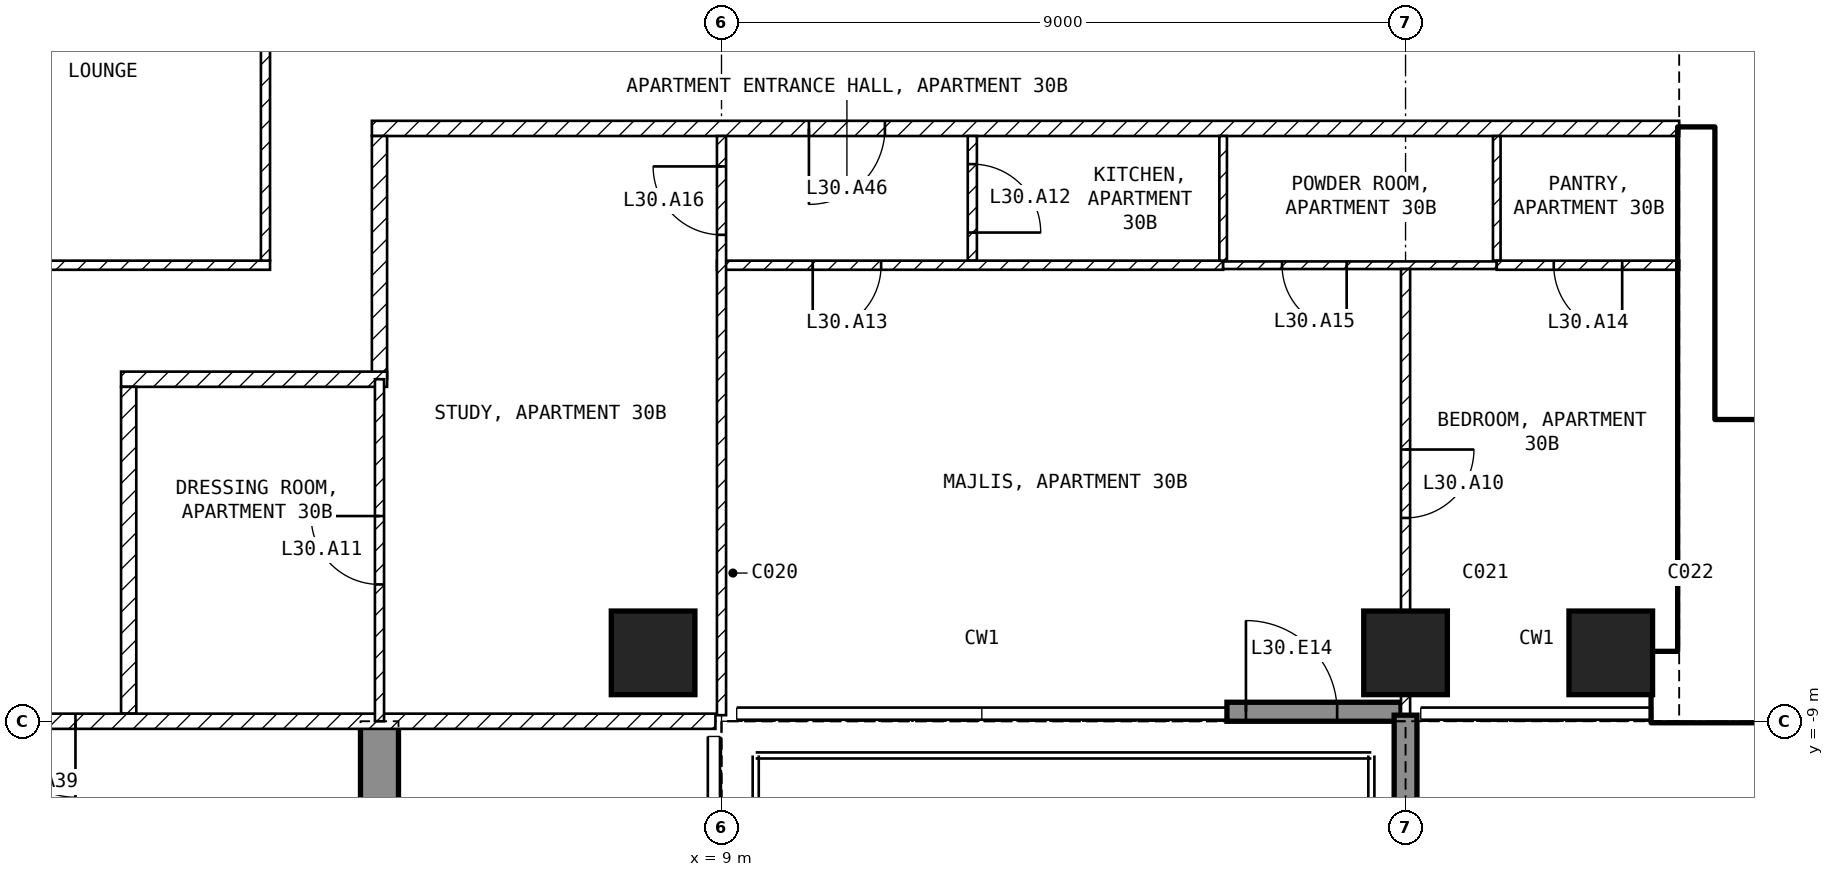
"""IFC4 building model, lengths in metres.
Left out: names, types, materials, properties, quantities, classifications, styles, units other than length and angle.
Written with IfcOpenShell. Run it as: python <this file> out.ifc"""

import sys

from ifc_helpers import new_model, si_unit, direction, frame, frame_2d, origin, origin_2d, place, context, subcontext, project, spatial, polyline, rectangle, outline, extrude, element, fill, save


model = new_model("IFC4")
c1 = context("Model", 3, precision=1e-05, world=origin(), true_north=direction((0.0, 1.0)))
c2 = subcontext(c1, "Body", "Model", "MODEL_VIEW")
j1 = project(units=[si_unit("LENGTHUNIT", "METRE"), si_unit("PLANEANGLEUNIT", "RADIAN")], contexts=[c1])
p1 = place(None, origin())
s1 = spatial("IfcSite", under=j1, at=p1, CompositionType="ELEMENT")
p2 = place(p1, origin())
s2 = spatial("IfcBuilding", under=s1, at=p2, CompositionType="ELEMENT")
p3 = place(p2, frame((0.0, 0.0, 126.9)))
s3 = spatial("IfcBuildingStorey", under=s2, at=p3, CompositionType="ELEMENT", Elevation=126.9)
for number, where, z_axis, x_axis in (
    (1, (8.1, -8.1, -0.25), (0.0, 0.0, 1.0), (1.0, 0.0, 0.0)),
    (2, (18.0, -8.1, -0.25), (0.0, 0.0, 1.0), (1.0, 0.0, 0.0)),
    (3, (20.7, -8.1, -0.25), (0.0, 0.0, 1.0), (1.0, 0.0, 0.0)),
):
    element("IfcColumn", number, at=place(p3, frame(where, z_axis=z_axis, x_axis=x_axis)), inside=s3, PredefinedType="COLUMN", context=c2, shape_type="SweptSolid", body=[
        extrude(rectangle(XDim=1.1, YDim=1.1, at=origin_2d()), origin(), (0.0, 0.0, 1.0), 3.5),
    ])
p4 = place(p3, frame((4.25, -20.15, -0.25), z_axis=(1.0, 0.0, 0.0), x_axis=(0.0, 1.0, 0.0)))
e4 = element("IfcWall", 4, at=p4, inside=s3, PredefinedType="SHEAR", context=c2, shape_type="SweptSolid", body=[
    extrude(outline(polyline([(0.0, 0.0), (6.65, 0.0), (6.65, 2.65), (9.05, 2.65), (9.05, 0.0), (11.15, 0.0), (11.15, 3.5), (0.0, 3.5), (0.0, 0.0)])), origin(), (0.0, 0.0, 1.0), 0.5),
])
p5 = place(p3, frame((15.65, -8.875, 0.0), z_axis=(0.0, 0.0, 1.0), x_axis=(1.0, 0.0, 0.0)))
e5 = element("IfcWall", 5, at=p5, inside=s3, PredefinedType="SOLIDWALL", context=c2, shape_type="SweptSolid", body=[
    extrude(rectangle(XDim=2.29, YDim=0.25, at=frame_2d((1.145, 0.0))), origin(), (0.0, 0.0, 1.0), 3.25),
])
p6 = place(p5, frame((0.25, 0.0, 0.0)))
e6 = element("IfcOpeningElement", 6, at=p6, cuts=e5, PredefinedType="OPENING", context=c2, shape_type="SweptSolid", body=[
    extrude(rectangle(XDim=1.2, YDim=2.4, at=frame_2d((0.6, 1.2))), frame((0.0, 0.135, 0.0), z_axis=(0.0, -1.0, 0.0), x_axis=(1.0, 0.0, 0.0)), (0.0, 0.0, 1.0), 0.27),
])
p7 = place(p3, frame((18.0, -8.92, 0.0), z_axis=(0.0, 0.0, 1.0), x_axis=(0.0, -1.0, 0.0)))
e7 = element("IfcWall", 7, at=p7, inside=s3, PredefinedType="SOLIDWALL", context=c2, shape_type="SweptSolid", body=[
    extrude(rectangle(XDim=2.82, YDim=0.3, at=frame_2d((1.41, 0.0))), origin(), (0.0, 0.0, 1.0), 3.25),
])
p8 = place(p3, frame((21.25, -8.55, 0.0), z_axis=(0.0, 0.0, 1.0), x_axis=(1.0, 0.0, 0.0)))
e8 = element("IfcWall", 8, at=p8, inside=s3, PredefinedType="SHEAR", context=c2, shape_type="SweptSolid", body=[
    extrude(rectangle(XDim=8.95, YDim=0.9, at=frame_2d((4.475, 0.0))), origin(), (0.0, 0.0, 1.0), 3.25),
])
p9 = place(p3, frame((21.825, -8.1, 0.0), z_axis=(0.0, 0.0, 1.0), x_axis=(0.0, 1.0, 0.0)))
e9 = element("IfcWall", 9, at=p9, inside=s3, PredefinedType="SHEAR", context=c2, shape_type="SweptSolid", body=[
    extrude(rectangle(XDim=6.9, YDim=0.45, at=frame_2d((3.45, 0.0))), origin(), (0.0, 0.0, 1.0), 3.25),
])
p10 = place(p3, frame((22.05, -5.15, 0.0), z_axis=(0.0, 0.0, 1.0), x_axis=(1.0, 0.0, 0.0)))
e10 = element("IfcWall", 10, at=p10, inside=s3, PredefinedType="SOLIDWALL", context=c2, shape_type="SweptSolid", body=[
    extrude(rectangle(XDim=6.3, YDim=0.2, at=frame_2d((3.15, 0.0))), origin(), (0.0, 0.0, 1.0), 3.25),
])
p11 = place(p10, frame((0.2, 0.0, 0.0)))
e11 = element("IfcOpeningElement", 11, at=p11, cuts=e10, PredefinedType="OPENING", context=c2, shape_type="SweptSolid", body=[
    extrude(rectangle(XDim=1.0, YDim=2.1, at=frame_2d((0.5, 1.05))), frame((0.0, 0.11, 0.0), z_axis=(0.0, -1.0, 0.0), x_axis=(1.0, 0.0, 0.0)), (0.0, 0.0, 1.0), 0.22),
])
p12 = place(p3, frame((-3.06, -3.0, 0.0), z_axis=(0.0, 0.0, 1.0), x_axis=(1.0, 0.0, 0.0)))
e12 = element("IfcWall", 12, at=p12, inside=s3, PredefinedType="PARTITIONING", context=c2, shape_type="SweptSolid", body=[
    extrude(rectangle(XDim=6.12, YDim=0.12, at=frame_2d((3.06, 0.0))), origin(), (0.0, 0.0, 1.0), 3.25),
])
p13 = place(p3, frame((3.0, -2.94, 0.0), z_axis=(0.0, 0.0, 1.0), x_axis=(0.0, 1.0, 0.0)))
e13 = element("IfcWall", 13, at=p13, inside=s3, PredefinedType="PARTITIONING", context=c2, shape_type="SweptSolid", body=[
    extrude(rectangle(XDim=5.88, YDim=0.12, at=frame_2d((2.94, 0.0))), origin(), (0.0, 0.0, 1.0), 3.25),
])
p14 = place(p3, frame((21.6, -1.2, 0.0), z_axis=(0.0, 0.0, 1.0), x_axis=(-1.0, 0.0, 0.0)))
e14 = element("IfcWall", 14, at=p14, inside=s3, PredefinedType="PARTITIONING", context=c2, shape_type="SweptSolid", body=[
    extrude(rectangle(XDim=17.2, YDim=0.2, at=frame_2d((8.6, 0.0))), origin(), (0.0, 0.0, 1.0), 3.25),
])
p15 = place(p14, frame((10.45, 0.0, 0.0)))
e15 = element("IfcOpeningElement", 15, at=p15, cuts=e14, PredefinedType="OPENING", context=c2, shape_type="SweptSolid", body=[
    extrude(rectangle(XDim=1.0, YDim=2.1, at=frame_2d((0.5, 1.05))), frame((0.0, 0.11, 0.0), z_axis=(0.0, -1.0, 0.0), x_axis=(1.0, 0.0, 0.0)), (0.0, 0.0, 1.0), 0.22),
])
p16 = place(p3, frame((4.5, -1.3, 0.0), z_axis=(0.0, 0.0, 1.0), x_axis=(0.0, -1.0, 0.0)))
e16 = element("IfcWall", 16, at=p16, inside=s3, PredefinedType="PARTITIONING", context=c2, shape_type="SweptSolid", body=[
    extrude(rectangle(XDim=3.2, YDim=0.2, at=frame_2d((1.6, 0.0))), origin(), (0.0, 0.0, 1.0), 3.25),
])
p17 = place(p3, frame((4.6, -4.5, 0.0), z_axis=(0.0, 0.0, 1.0), x_axis=(-1.0, 0.0, 0.0)))
e17 = element("IfcWall", 17, at=p17, inside=s3, PredefinedType="PARTITIONING", context=c2, shape_type="SweptSolid", body=[
    extrude(rectangle(XDim=3.5, YDim=0.2, at=frame_2d((1.75, 0.0))), origin(), (0.0, 0.0, 1.0), 3.25),
])
p18 = place(p3, frame((1.2, -4.6, 0.0), z_axis=(0.0, 0.0, 1.0), x_axis=(0.0, -1.0, 0.0)))
e18 = element("IfcWall", 18, at=p18, inside=s3, PredefinedType="PARTITIONING", context=c2, shape_type="SweptSolid", body=[
    extrude(rectangle(XDim=4.3, YDim=0.2, at=frame_2d((2.15, 0.0))), origin(), (0.0, 0.0, 1.0), 3.25),
])
p19 = place(p3, frame((8.92, -9.0, 0.0), z_axis=(0.0, 0.0, 1.0), x_axis=(-1.0, 0.0, 0.0)))
e19 = element("IfcWall", 19, at=p19, inside=s3, PredefinedType="PARTITIONING", context=c2, shape_type="SweptSolid", body=[
    extrude(rectangle(XDim=17.84, YDim=0.2, at=frame_2d((8.92, 0.0))), origin(), (0.0, 0.0, 1.0), 3.25),
])
p20 = place(p19, frame((8.42, 0.0, 0.0)))
e20 = element("IfcOpeningElement", 20, at=p20, cuts=e19, PredefinedType="OPENING", context=c2, shape_type="SweptSolid", body=[
    extrude(rectangle(XDim=1.0, YDim=2.1, at=frame_2d((0.5, 1.05))), frame((0.0, 0.11, 0.0), z_axis=(0.0, -1.0, 0.0), x_axis=(1.0, 0.0, 0.0)), (0.0, 0.0, 1.0), 0.22),
])
p21 = place(p3, frame((12.3, -1.3, 0.0), z_axis=(0.0, 0.0, 1.0), x_axis=(0.0, -1.0, 0.0)))
e21 = element("IfcWall", 21, at=p21, inside=s3, PredefinedType="PARTITIONING", context=c2, shape_type="SweptSolid", body=[
    extrude(rectangle(XDim=1.64, YDim=0.12, at=frame_2d((0.82, 0.0))), origin(), (0.0, 0.0, 1.0), 3.25),
])
p22 = place(p21, frame((0.37, 0.0, 0.0)))
e22 = element("IfcOpeningElement", 22, at=p22, cuts=e21, PredefinedType="OPENING", context=c2, shape_type="SweptSolid", body=[
    extrude(rectangle(XDim=0.9, YDim=2.1, at=frame_2d((0.45, 1.05))), frame((0.0, 0.07, 0.0), z_axis=(0.0, -1.0, 0.0), x_axis=(1.0, 0.0, 0.0)), (0.0, 0.0, 1.0), 0.14),
])
p23 = place(p3, frame((15.6, -3.0, 0.0), z_axis=(0.0, 0.0, 1.0), x_axis=(-1.0, 0.0, 0.0)))
e23 = element("IfcWall", 23, at=p23, inside=s3, PredefinedType="PARTITIONING", context=c2, shape_type="SweptSolid", body=[
    extrude(rectangle(XDim=6.66, YDim=0.12, at=frame_2d((3.33, 0.0))), origin(), (0.0, 0.0, 1.0), 3.25),
])
p24 = place(p23, frame((4.5, 0.0, 0.0)))
e24 = element("IfcOpeningElement", 24, at=p24, cuts=e23, PredefinedType="OPENING", context=c2, shape_type="SweptSolid", body=[
    extrude(rectangle(XDim=0.9, YDim=2.1, at=frame_2d((0.45, 1.05))), frame((0.0, 0.07, 0.0), z_axis=(0.0, -1.0, 0.0), x_axis=(1.0, 0.0, 0.0)), (0.0, 0.0, 1.0), 0.14),
])
p25 = place(p3, frame((9.0, -8.92, 0.0), z_axis=(0.0, 0.0, 1.0), x_axis=(0.0, 1.0, 0.0)))
e25 = element("IfcWall", 25, at=p25, inside=s3, PredefinedType="PARTITIONING", context=c2, shape_type="SweptSolid", body=[
    extrude(rectangle(XDim=7.62, YDim=0.12, at=frame_2d((3.81, 0.0))), origin(), (0.0, 0.0, 1.0), 3.25),
])
p26 = place(p25, frame((6.32, 0.0, 0.0)))
e26 = element("IfcOpeningElement", 26, at=p26, cuts=e25, PredefinedType="OPENING", context=c2, shape_type="SweptSolid", body=[
    extrude(rectangle(XDim=0.9, YDim=2.1, at=frame_2d((0.45, 1.05))), frame((0.0, 0.07, 0.0), z_axis=(0.0, -1.0, 0.0), x_axis=(1.0, 0.0, 0.0)), (0.0, 0.0, 1.0), 0.14),
])
for number, where, z_axis, x_axis in (
    (27, (15.6, -1.3, 0.0), (0.0, 0.0, 1.0), (0.0, -1.0, 0.0)),
    (28, (19.2, -1.3, 0.0), (0.0, 0.0, 1.0), (0.0, -1.0, 0.0)),
):
    element("IfcWall", number, at=place(p3, frame(where, z_axis=z_axis, x_axis=x_axis)), inside=s3, PredefinedType="PARTITIONING", context=c2, shape_type="SweptSolid", body=[
        extrude(rectangle(XDim=1.64, YDim=0.1, at=frame_2d((0.82, 0.0))), origin(), (0.0, 0.0, 1.0), 3.25),
    ])
p27 = place(p3, frame((19.2, -3.0, 0.0), z_axis=(0.0, 0.0, 1.0), x_axis=(-1.0, 0.0, 0.0)))
e29 = element("IfcWall", 29, at=p27, inside=s3, PredefinedType="PARTITIONING", context=c2, shape_type="SweptSolid", body=[
    extrude(rectangle(XDim=3.6, YDim=0.1, at=frame_2d((1.8, 0.0))), origin(), (0.0, 0.0, 1.0), 3.25),
])
p28 = place(p27, frame((1.975, 0.0, 0.0)))
e30 = element("IfcOpeningElement", 30, at=p28, cuts=e29, PredefinedType="OPENING", context=c2, shape_type="SweptSolid", body=[
    extrude(rectangle(XDim=0.85, YDim=2.1, at=frame_2d((0.425, 1.05))), frame((0.0, 0.06, 0.0), z_axis=(0.0, -1.0, 0.0), x_axis=(1.0, 0.0, 0.0)), (0.0, 0.0, 1.0), 0.12),
])
p29 = place(p3, frame((21.6, -3.0, 0.0), z_axis=(0.0, 0.0, 1.0), x_axis=(-1.0, 0.0, 0.0)))
e31 = element("IfcWall", 31, at=p29, inside=s3, PredefinedType="PARTITIONING", context=c2, shape_type="SweptSolid", body=[
    extrude(rectangle(XDim=2.4, YDim=0.12, at=frame_2d((1.2, 0.0))), origin(), (0.0, 0.0, 1.0), 3.25),
])
p30 = place(p29, frame((0.75, 0.0, 0.0)))
e32 = element("IfcOpeningElement", 32, at=p30, cuts=e31, PredefinedType="OPENING", context=c2, shape_type="SweptSolid", body=[
    extrude(rectangle(XDim=0.9, YDim=2.1, at=frame_2d((0.45, 1.05))), frame((0.0, 0.07, 0.0), z_axis=(0.0, -1.0, 0.0), x_axis=(1.0, 0.0, 0.0)), (0.0, 0.0, 1.0), 0.14),
])
p31 = place(p3, frame((18.0, -3.05, 0.0), z_axis=(0.0, 0.0, 1.0), x_axis=(0.0, -1.0, 0.0)))
e33 = element("IfcWall", 33, at=p31, inside=s3, PredefinedType="PARTITIONING", context=c2, shape_type="SweptSolid", body=[
    extrude(rectangle(XDim=5.87, YDim=0.12, at=frame_2d((2.935, 0.0))), origin(), (0.0, 0.0, 1.0), 2.414),
])
p32 = place(p31, frame((2.375, 0.0, 0.0)))
e34 = element("IfcOpeningElement", 34, at=p32, cuts=e33, PredefinedType="OPENING", context=c2, shape_type="SweptSolid", body=[
    extrude(rectangle(XDim=0.9, YDim=2.1, at=frame_2d((0.45, 1.05))), frame((0.0, 0.07, 0.0), z_axis=(0.0, -1.0, 0.0), x_axis=(1.0, 0.0, 0.0)), (0.0, 0.0, 1.0), 0.14),
])
p33 = place(p3, frame((4.5, -9.0, 0.0), z_axis=(0.0, 0.0, 1.0), x_axis=(0.0, 1.0, 0.0)))
e35 = element("IfcWall", 35, at=p33, inside=s3, PredefinedType="PARTITIONING", context=c2, shape_type="SweptSolid", body=[
    extrude(rectangle(XDim=4.5, YDim=0.12, at=frame_2d((2.25, 0.0))), origin(), (0.0, 0.0, 1.0), 3.25),
])
p34 = place(p33, frame((1.8, 0.0, 0.0)))
e36 = element("IfcOpeningElement", 36, at=p34, cuts=e35, PredefinedType="OPENING", context=c2, shape_type="SweptSolid", body=[
    extrude(rectangle(XDim=0.9, YDim=2.1, at=frame_2d((0.45, 1.05))), frame((0.0, 0.07, 0.0), z_axis=(0.0, -1.0, 0.0), x_axis=(1.0, 0.0, 0.0)), (0.0, 0.0, 1.0), 0.14),
])
p35 = place(p6, origin())
e37 = element("IfcDoor", 37, at=p35, inside=s3, OperationType="SINGLE_SWING_LEFT", PredefinedType="DOOR", context=c2, shape_type="SweptSolid", body=[
    extrude(rectangle(XDim=1.2, YDim=2.4, at=frame_2d((0.6, 1.2))), frame((0.0, 0.025, 0.0), z_axis=(0.0, -1.0, 0.0), x_axis=(1.0, 0.0, 0.0)), (0.0, 0.0, 1.0), 0.05),
])
fill(e6, e37)
p36 = place(p11, origin())
e38 = element("IfcDoor", 38, at=p36, inside=s3, OperationType="SINGLE_SWING_LEFT", PredefinedType="DOOR", context=c2, shape_type="SweptSolid", body=[
    extrude(rectangle(XDim=1.0, YDim=2.1, at=frame_2d((0.5, 1.05))), frame((0.0, 0.025, 0.0), z_axis=(0.0, -1.0, 0.0), x_axis=(1.0, 0.0, 0.0)), (0.0, 0.0, 1.0), 0.05),
])
fill(e11, e38)
p37 = place(p32, origin())
e39 = element("IfcDoor", 39, at=p37, inside=s3, OperationType="SINGLE_SWING_LEFT", PredefinedType="DOOR", context=c2, shape_type="SweptSolid", body=[
    extrude(rectangle(XDim=0.9, YDim=2.1, at=frame_2d((0.45, 1.05))), frame((0.0, 0.025, 0.0), z_axis=(0.0, -1.0, 0.0), x_axis=(1.0, 0.0, 0.0)), (0.0, 0.0, 1.0), 0.05),
])
fill(e34, e39)
p38 = place(p34, origin())
e40 = element("IfcDoor", 40, at=p38, inside=s3, OperationType="SINGLE_SWING_RIGHT", PredefinedType="DOOR", context=c2, shape_type="SweptSolid", body=[
    extrude(rectangle(XDim=0.9, YDim=2.1, at=frame_2d((0.45, 1.05))), frame((0.0, 0.025, 0.0), z_axis=(0.0, -1.0, 0.0), x_axis=(1.0, 0.0, 0.0)), (0.0, 0.0, 1.0), 0.05),
])
fill(e36, e40)
p39 = place(p22, origin())
e41 = element("IfcDoor", 41, at=p39, inside=s3, OperationType="SINGLE_SWING_RIGHT", PredefinedType="DOOR", context=c2, shape_type="SweptSolid", body=[
    extrude(rectangle(XDim=0.9, YDim=2.1, at=frame_2d((0.45, 1.05))), frame((0.0, 0.025, 0.0), z_axis=(0.0, -1.0, 0.0), x_axis=(1.0, 0.0, 0.0)), (0.0, 0.0, 1.0), 0.05),
])
fill(e22, e41)
p40 = place(p24, origin())
e42 = element("IfcDoor", 42, at=p40, inside=s3, OperationType="SINGLE_SWING_RIGHT", PredefinedType="DOOR", context=c2, shape_type="SweptSolid", body=[
    extrude(rectangle(XDim=0.9, YDim=2.1, at=frame_2d((0.45, 1.05))), frame((0.0, 0.025, 0.0), z_axis=(0.0, -1.0, 0.0), x_axis=(1.0, 0.0, 0.0)), (0.0, 0.0, 1.0), 0.05),
])
fill(e24, e42)
p41 = place(p30, origin())
e43 = element("IfcDoor", 43, at=p41, inside=s3, OperationType="SINGLE_SWING_LEFT", PredefinedType="DOOR", context=c2, shape_type="SweptSolid", body=[
    extrude(rectangle(XDim=0.9, YDim=2.1, at=frame_2d((0.45, 1.05))), frame((0.0, 0.025, 0.0), z_axis=(0.0, -1.0, 0.0), x_axis=(1.0, 0.0, 0.0)), (0.0, 0.0, 1.0), 0.05),
])
fill(e32, e43)
p42 = place(p28, origin())
e44 = element("IfcDoor", 44, at=p42, inside=s3, OperationType="SINGLE_SWING_LEFT", PredefinedType="DOOR", context=c2, shape_type="SweptSolid", body=[
    extrude(rectangle(XDim=0.85, YDim=2.1, at=frame_2d((0.425, 1.05))), frame((0.0, 0.025, 0.0), z_axis=(0.0, -1.0, 0.0), x_axis=(1.0, 0.0, 0.0)), (0.0, 0.0, 1.0), 0.05),
])
fill(e30, e44)
p43 = place(p26, origin())
e45 = element("IfcDoor", 45, at=p43, inside=s3, OperationType="SINGLE_SWING_RIGHT", PredefinedType="DOOR", context=c2, shape_type="SweptSolid", body=[
    extrude(rectangle(XDim=0.9, YDim=2.1, at=frame_2d((0.45, 1.05))), frame((0.0, 0.025, 0.0), z_axis=(0.0, -1.0, 0.0), x_axis=(1.0, 0.0, 0.0)), (0.0, 0.0, 1.0), 0.05),
])
fill(e26, e45)
p44 = place(p20, origin())
e46 = element("IfcDoor", 46, at=p44, inside=s3, OperationType="SINGLE_SWING_LEFT", PredefinedType="DOOR", context=c2, shape_type="SweptSolid", body=[
    extrude(rectangle(XDim=1.0, YDim=2.1, at=frame_2d((0.5, 1.05))), frame((0.0, 0.025, 0.0), z_axis=(0.0, -1.0, 0.0), x_axis=(1.0, 0.0, 0.0)), (0.0, 0.0, 1.0), 0.05),
])
fill(e20, e46)
p45 = place(p15, origin())
e47 = element("IfcDoor", 47, at=p45, inside=s3, OperationType="SINGLE_SWING_RIGHT", PredefinedType="DOOR", context=c2, shape_type="SweptSolid", body=[
    extrude(rectangle(XDim=1.0, YDim=2.1, at=frame_2d((0.5, 1.05))), frame((0.0, 0.025, 0.0), z_axis=(0.0, -1.0, 0.0), x_axis=(1.0, 0.0, 0.0)), (0.0, 0.0, 1.0), 0.05),
])
fill(e15, e47)
save(model, sys.argv[1])
